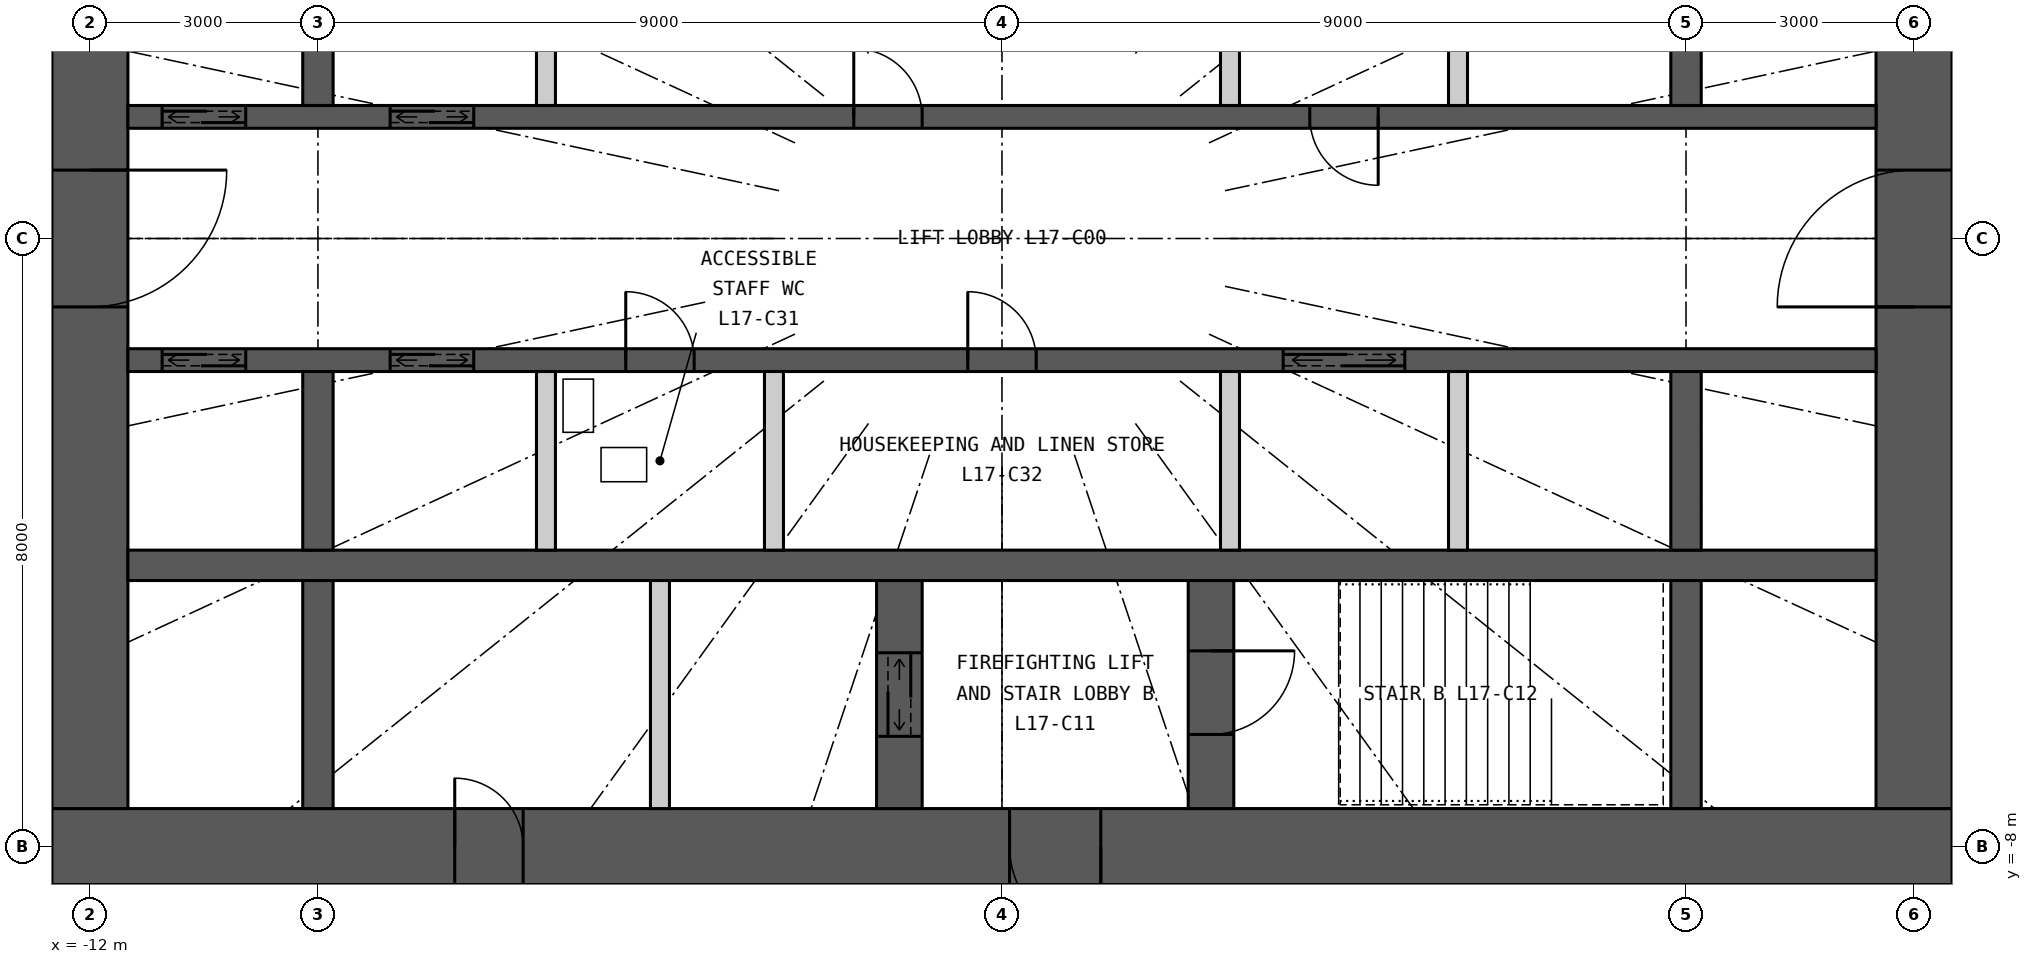
"""IFC4 building model, lengths in metres.
Left out: names, types, materials, properties, quantities, classifications, styles, units other than length and angle.
Written with IfcOpenShell. Run it as: python <this file> out.ifc"""

import sys

from ifc_helpers import new_model, si_unit, direction, frame, frame_2d, origin, place, context, subcontext, project, spatial, rectangle, extrude, element, fill, save


model = new_model("IFC4")
c1 = context("Model", 3, precision=1e-05, world=origin(), true_north=direction((0.0, 1.0)))
c2 = subcontext(c1, "Body", "Model", "MODEL_VIEW")
j1 = project(units=[si_unit("LENGTHUNIT", "METRE"), si_unit("PLANEANGLEUNIT", "RADIAN")], contexts=[c1])
p1 = place(None, origin())
s1 = spatial("IfcSite", under=j1, at=p1, CompositionType="ELEMENT")
p2 = place(p1, origin())
s2 = spatial("IfcBuilding", under=s1, at=p2, CompositionType="ELEMENT")
p3 = place(p2, frame((0.0, 0.0, 70.5)))
s3 = spatial("IfcBuildingStorey", under=s2, at=p3, CompositionType="ELEMENT", Elevation=70.5)
p4 = place(p3, frame((12.5, -8.0, 0.0), z_axis=(0.0, 0.0, 1.0), x_axis=(-1.0, 0.0, 0.0)))
e1 = element("IfcWall", 1, at=p4, inside=s3, PredefinedType="SHEAR", context=c2, shape_type="SweptSolid", body=[
    extrude(rectangle(XDim=25.0, YDim=1.0, at=frame_2d((12.5, 0.0))), origin(), (0.0, 0.0, 1.0), 3.3),
])
p5 = place(p4, frame((11.2, 0.0, 0.0)))
e2 = element("IfcOpeningElement", 2, at=p5, cuts=e1, PredefinedType="OPENING", context=c2, shape_type="SweptSolid", body=[
    extrude(rectangle(XDim=1.2, YDim=2.2, at=frame_2d((0.6, 1.1))), frame((0.0, 0.51, 0.0), z_axis=(0.0, -1.0, 0.0), x_axis=(1.0, 0.0, 0.0)), (0.0, 0.0, 1.0), 1.02),
])
p6 = place(p4, frame((18.8, 0.0, 0.0)))
e3 = element("IfcOpeningElement", 3, at=p6, cuts=e1, PredefinedType="OPENING", context=c2, shape_type="SweptSolid", body=[
    extrude(rectangle(XDim=0.9, YDim=2.2, at=frame_2d((0.45, 1.1))), frame((0.0, 0.51, 0.0), z_axis=(0.0, -1.0, 0.0), x_axis=(1.0, 0.0, 0.0)), (0.0, 0.0, 1.0), 1.02),
])
p7 = place(p3, frame((12.0, -7.5, 0.0), z_axis=(0.0, 0.0, 1.0), x_axis=(0.0, 1.0, 0.0)))
e4 = element("IfcWall", 4, at=p7, inside=s3, PredefinedType="SHEAR", context=c2, shape_type="SweptSolid", body=[
    extrude(rectangle(XDim=15.0, YDim=1.0, at=frame_2d((7.5, 0.0))), origin(), (0.0, 0.0, 1.0), 3.3),
])
p8 = place(p7, frame((6.6, 0.0, 0.0)))
e5 = element("IfcOpeningElement", 5, at=p8, cuts=e4, PredefinedType="OPENING", context=c2, shape_type="SweptSolid", body=[
    extrude(rectangle(XDim=1.8, YDim=2.2, at=frame_2d((0.9, 1.1))), frame((0.0, 0.51, 0.0), z_axis=(0.0, -1.0, 0.0), x_axis=(1.0, 0.0, 0.0)), (0.0, 0.0, 1.0), 1.02),
])
p9 = place(p3, frame((-12.0, 7.5, 0.0), z_axis=(0.0, 0.0, 1.0), x_axis=(0.0, -1.0, 0.0)))
e6 = element("IfcWall", 6, at=p9, inside=s3, PredefinedType="SHEAR", context=c2, shape_type="SweptSolid", body=[
    extrude(rectangle(XDim=15.0, YDim=1.0, at=frame_2d((7.5, 0.0))), origin(), (0.0, 0.0, 1.0), 3.3),
])
p10 = place(p9, frame((6.6, 0.0, 0.0)))
e7 = element("IfcOpeningElement", 7, at=p10, cuts=e6, PredefinedType="OPENING", context=c2, shape_type="SweptSolid", body=[
    extrude(rectangle(XDim=1.8, YDim=2.2, at=frame_2d((0.9, 1.1))), frame((0.0, 0.51, 0.0), z_axis=(0.0, -1.0, 0.0), x_axis=(1.0, 0.0, 0.0)), (0.0, 0.0, 1.0), 1.02),
])
p11 = place(p3, frame((-11.5, 1.6, 0.0), z_axis=(0.0, 0.0, 1.0), x_axis=(1.0, 0.0, 0.0)))
e8 = element("IfcWall", 8, at=p11, inside=s3, PredefinedType="SHEAR", context=c2, shape_type="SweptSolid", body=[
    extrude(rectangle(XDim=23.0, YDim=0.3, at=frame_2d((11.5, 0.0))), origin(), (0.0, 0.0, 1.0), 3.3),
])
p12 = place(p11, frame((0.45, 0.0, 0.0)))
e9 = element("IfcOpeningElement", 9, at=p12, cuts=e8, PredefinedType="OPENING", context=c2, shape_type="SweptSolid", body=[
    extrude(rectangle(XDim=1.1, YDim=2.2, at=frame_2d((0.55, 1.1))), frame((0.0, 0.16, 0.0), z_axis=(0.0, -1.0, 0.0), x_axis=(1.0, 0.0, 0.0)), (0.0, 0.0, 1.0), 0.32),
])
p13 = place(p11, frame((3.45, 0.0, 0.0)))
e10 = element("IfcOpeningElement", 10, at=p13, cuts=e8, PredefinedType="OPENING", context=c2, shape_type="SweptSolid", body=[
    extrude(rectangle(XDim=1.1, YDim=2.2, at=frame_2d((0.55, 1.1))), frame((0.0, 0.16, 0.0), z_axis=(0.0, -1.0, 0.0), x_axis=(1.0, 0.0, 0.0)), (0.0, 0.0, 1.0), 0.32),
])
p14 = place(p11, frame((9.55, 0.0, 0.0)))
e11 = element("IfcOpeningElement", 11, at=p14, cuts=e8, PredefinedType="OPENING", context=c2, shape_type="SweptSolid", body=[
    extrude(rectangle(XDim=0.9, YDim=2.2, at=frame_2d((0.45, 1.1))), frame((0.0, 0.16, 0.0), z_axis=(0.0, -1.0, 0.0), x_axis=(1.0, 0.0, 0.0)), (0.0, 0.0, 1.0), 0.32),
])
p15 = place(p11, frame((15.55, 0.0, 0.0)))
e12 = element("IfcOpeningElement", 12, at=p15, cuts=e8, PredefinedType="OPENING", context=c2, shape_type="SweptSolid", body=[
    extrude(rectangle(XDim=0.9, YDim=2.2, at=frame_2d((0.45, 1.1))), frame((0.0, 0.16, 0.0), z_axis=(0.0, -1.0, 0.0), x_axis=(1.0, 0.0, 0.0)), (0.0, 0.0, 1.0), 0.32),
])
p16 = place(p3, frame((-11.5, -4.3, 0.0), z_axis=(0.0, 0.0, 1.0), x_axis=(1.0, 0.0, 0.0)))
e13 = element("IfcWall", 13, at=p16, inside=s3, PredefinedType="SHEAR", context=c2, shape_type="SweptSolid", body=[
    extrude(rectangle(XDim=23.0, YDim=0.4, at=frame_2d((11.5, 0.0))), origin(), (0.0, 0.0, 1.0), 3.3),
])
p17 = place(p3, frame((-11.5, -1.6, 0.0), z_axis=(0.0, 0.0, 1.0), x_axis=(1.0, 0.0, 0.0)))
e14 = element("IfcWall", 14, at=p17, inside=s3, PredefinedType="SHEAR", context=c2, shape_type="SweptSolid", body=[
    extrude(rectangle(XDim=23.0, YDim=0.3, at=frame_2d((11.5, 0.0))), origin(), (0.0, 0.0, 1.0), 3.3),
])
p18 = place(p17, frame((0.45, 0.0, 0.0)))
e15 = element("IfcOpeningElement", 15, at=p18, cuts=e14, PredefinedType="OPENING", context=c2, shape_type="SweptSolid", body=[
    extrude(rectangle(XDim=1.1, YDim=2.2, at=frame_2d((0.55, 1.1))), frame((0.0, 0.16, 0.0), z_axis=(0.0, -1.0, 0.0), x_axis=(1.0, 0.0, 0.0)), (0.0, 0.0, 1.0), 0.32),
])
p19 = place(p17, frame((3.45, 0.0, 0.0)))
e16 = element("IfcOpeningElement", 16, at=p19, cuts=e14, PredefinedType="OPENING", context=c2, shape_type="SweptSolid", body=[
    extrude(rectangle(XDim=1.1, YDim=2.2, at=frame_2d((0.55, 1.1))), frame((0.0, 0.16, 0.0), z_axis=(0.0, -1.0, 0.0), x_axis=(1.0, 0.0, 0.0)), (0.0, 0.0, 1.0), 0.32),
])
p20 = place(p17, frame((15.2, 0.0, 0.0)))
e17 = element("IfcOpeningElement", 17, at=p20, cuts=e14, PredefinedType="OPENING", context=c2, shape_type="SweptSolid", body=[
    extrude(rectangle(XDim=1.6, YDim=2.4, at=frame_2d((0.8, 1.2))), frame((0.0, 0.16, 0.0), z_axis=(0.0, -1.0, 0.0), x_axis=(1.0, 0.0, 0.0)), (0.0, 0.0, 1.0), 0.32),
])
p21 = place(p17, frame((6.55, 0.0, 0.0)))
e18 = element("IfcOpeningElement", 18, at=p21, cuts=e14, PredefinedType="OPENING", context=c2, shape_type="SweptSolid", body=[
    extrude(rectangle(XDim=0.9, YDim=2.2, at=frame_2d((0.45, 1.1))), frame((0.0, 0.16, 0.0), z_axis=(0.0, -1.0, 0.0), x_axis=(1.0, 0.0, 0.0)), (0.0, 0.0, 1.0), 0.32),
])
p22 = place(p17, frame((11.05, 0.0, 0.0)))
e19 = element("IfcOpeningElement", 19, at=p22, cuts=e14, PredefinedType="OPENING", context=c2, shape_type="SweptSolid", body=[
    extrude(rectangle(XDim=0.9, YDim=2.2, at=frame_2d((0.45, 1.1))), frame((0.0, 0.16, 0.0), z_axis=(0.0, -1.0, 0.0), x_axis=(1.0, 0.0, 0.0)), (0.0, 0.0, 1.0), 0.32),
])
for number, where, z_axis, x_axis in (
    (20, (-9.0, 1.75, 0.0), (0.0, 0.0, 1.0), (0.0, 1.0, 0.0)),
    (21, (-9.0, -4.1, 0.0), (0.0, 0.0, 1.0), (0.0, 1.0, 0.0)),
):
    element("IfcWall", number, at=place(p3, frame(where, z_axis=z_axis, x_axis=x_axis)), inside=s3, PredefinedType="SHEAR", context=c2, shape_type="SweptSolid", body=[
        extrude(rectangle(XDim=2.35, YDim=0.4, at=frame_2d((1.175, 0.0))), origin(), (0.0, 0.0, 1.0), 3.3),
    ])
p23 = place(p3, frame((-9.0, -7.5, 0.0), z_axis=(0.0, 0.0, 1.0), x_axis=(0.0, 1.0, 0.0)))
e22 = element("IfcWall", 22, at=p23, inside=s3, PredefinedType="SHEAR", context=c2, shape_type="SweptSolid", body=[
    extrude(rectangle(XDim=3.0, YDim=0.4, at=frame_2d((1.5, 0.0))), origin(), (0.0, 0.0, 1.0), 3.3),
])
for number, where, z_axis, x_axis in (
    (23, (9.0, 1.75, 0.0), (0.0, 0.0, 1.0), (0.0, 1.0, 0.0)),
    (24, (9.0, -4.1, 0.0), (0.0, 0.0, 1.0), (0.0, 1.0, 0.0)),
):
    element("IfcWall", number, at=place(p3, frame(where, z_axis=z_axis, x_axis=x_axis)), inside=s3, PredefinedType="SHEAR", context=c2, shape_type="SweptSolid", body=[
        extrude(rectangle(XDim=2.35, YDim=0.4, at=frame_2d((1.175, 0.0))), origin(), (0.0, 0.0, 1.0), 3.3),
    ])
p24 = place(p3, frame((9.0, -7.5, 0.0), z_axis=(0.0, 0.0, 1.0), x_axis=(0.0, 1.0, 0.0)))
e25 = element("IfcWall", 25, at=p24, inside=s3, PredefinedType="SHEAR", context=c2, shape_type="SweptSolid", body=[
    extrude(rectangle(XDim=3.0, YDim=0.4, at=frame_2d((1.5, 0.0))), origin(), (0.0, 0.0, 1.0), 3.3),
])
p25 = place(p3, frame((2.75, -7.5, 0.0), z_axis=(0.0, 0.0, 1.0), x_axis=(0.0, 1.0, 0.0)))
e26 = element("IfcWall", 26, at=p25, inside=s3, PredefinedType="SHEAR", context=c2, shape_type="SweptSolid", body=[
    extrude(rectangle(XDim=3.0, YDim=0.6, at=frame_2d((1.5, 0.0))), origin(), (0.0, 0.0, 1.0), 3.3),
])
p26 = place(p25, frame((0.975, 0.0, 0.0)))
e27 = element("IfcOpeningElement", 27, at=p26, cuts=e26, PredefinedType="OPENING", context=c2, shape_type="SweptSolid", body=[
    extrude(rectangle(XDim=1.1, YDim=2.2, at=frame_2d((0.55, 1.1))), frame((0.0, 0.31, 0.0), z_axis=(0.0, -1.0, 0.0), x_axis=(1.0, 0.0, 0.0)), (0.0, 0.0, 1.0), 0.62),
])
p27 = place(p3, frame((-1.35, -7.5, 0.0), z_axis=(0.0, 0.0, 1.0), x_axis=(0.0, 1.0, 0.0)))
e28 = element("IfcWall", 28, at=p27, inside=s3, PredefinedType="SHEAR", context=c2, shape_type="SweptSolid", body=[
    extrude(rectangle(XDim=3.0, YDim=0.6, at=frame_2d((1.5, 0.0))), origin(), (0.0, 0.0, 1.0), 3.3),
])
p28 = place(p27, frame((0.95, 0.0, 0.0)))
e29 = element("IfcOpeningElement", 29, at=p28, cuts=e28, PredefinedType="OPENING", context=c2, shape_type="SweptSolid", body=[
    extrude(rectangle(XDim=1.1, YDim=2.2, at=frame_2d((0.55, 1.1))), frame((0.0, 0.31, 0.0), z_axis=(0.0, -1.0, 0.0), x_axis=(1.0, 0.0, 0.0)), (0.0, 0.0, 1.0), 0.62),
])
p29 = place(p3, frame((-4.5, -7.5, 0.0), z_axis=(0.0, 0.0, 1.0), x_axis=(0.0, 1.0, 0.0)))
e30 = element("IfcWall", 30, at=p29, inside=s3, PredefinedType="PARTITIONING", context=c2, shape_type="SweptSolid", body=[
    extrude(rectangle(XDim=3.0, YDim=0.25, at=frame_2d((1.5, 0.0))), origin(), (0.0, 0.0, 1.0), 3.3),
])
for number, where, z_axis, x_axis in (
    (31, (-6.0, 1.75, 0.0), (0.0, 0.0, 1.0), (0.0, 1.0, 0.0)),
    (32, (3.0, 1.75, 0.0), (0.0, 0.0, 1.0), (0.0, 1.0, 0.0)),
    (33, (6.0, 1.75, 0.0), (0.0, 0.0, 1.0), (0.0, 1.0, 0.0)),
    (34, (-6.0, -4.1, 0.0), (0.0, 0.0, 1.0), (0.0, 1.0, 0.0)),
    (35, (-3.0, -4.1, 0.0), (0.0, 0.0, 1.0), (0.0, 1.0, 0.0)),
    (36, (3.0, -4.1, 0.0), (0.0, 0.0, 1.0), (0.0, 1.0, 0.0)),
    (37, (6.0, -4.1, 0.0), (0.0, 0.0, 1.0), (0.0, 1.0, 0.0)),
):
    element("IfcWall", number, at=place(p3, frame(where, z_axis=z_axis, x_axis=x_axis)), inside=s3, PredefinedType="PARTITIONING", context=c2, shape_type="SweptSolid", body=[
        extrude(rectangle(XDim=2.35, YDim=0.25, at=frame_2d((1.175, 0.0))), origin(), (0.0, 0.0, 1.0), 3.3),
    ])
p30 = place(p5, origin())
e38 = element("IfcDoor", 38, at=p30, inside=s3, OperationType="SINGLE_SWING_LEFT", PredefinedType="DOOR", context=c2, shape_type="SweptSolid", body=[
    extrude(rectangle(XDim=1.2, YDim=2.2, at=frame_2d((0.6, 1.1))), frame((0.0, 0.025, 0.0), z_axis=(0.0, -1.0, 0.0), x_axis=(1.0, 0.0, 0.0)), (0.0, 0.0, 1.0), 0.05),
])
fill(e2, e38)
p31 = place(p26, origin())
e39 = element("IfcDoor", 39, at=p31, inside=s3, OperationType="SINGLE_SWING_RIGHT", PredefinedType="DOOR", context=c2, shape_type="SweptSolid", body=[
    extrude(rectangle(XDim=1.1, YDim=2.2, at=frame_2d((0.55, 1.1))), frame((0.0, 0.025, 0.0), z_axis=(0.0, -1.0, 0.0), x_axis=(1.0, 0.0, 0.0)), (0.0, 0.0, 1.0), 0.05),
])
fill(e27, e39)
p32 = place(p28, origin())
e40 = element("IfcDoor", 40, at=p32, inside=s3, OperationType="DOUBLE_DOOR_SLIDING", PredefinedType="DOOR", context=c2, shape_type="SweptSolid", body=[
    extrude(rectangle(XDim=1.1, YDim=2.2, at=frame_2d((0.55, 1.1))), frame((0.0, 0.025, 0.0), z_axis=(0.0, -1.0, 0.0), x_axis=(1.0, 0.0, 0.0)), (0.0, 0.0, 1.0), 0.05),
])
fill(e29, e40)
p33 = place(p6, origin())
e41 = element("IfcDoor", 41, at=p33, inside=s3, OperationType="SINGLE_SWING_RIGHT", PredefinedType="DOOR", context=c2, shape_type="SweptSolid", body=[
    extrude(rectangle(XDim=0.9, YDim=2.2, at=frame_2d((0.45, 1.1))), frame((0.0, 0.025, 0.0), z_axis=(0.0, -1.0, 0.0), x_axis=(1.0, 0.0, 0.0)), (0.0, 0.0, 1.0), 0.05),
])
fill(e3, e41)
p34 = place(p12, origin())
e42 = element("IfcDoor", 42, at=p34, inside=s3, OperationType="DOUBLE_DOOR_SLIDING", PredefinedType="DOOR", context=c2, shape_type="SweptSolid", body=[
    extrude(rectangle(XDim=1.1, YDim=2.2, at=frame_2d((0.55, 1.1))), frame((0.0, 0.025, 0.0), z_axis=(0.0, -1.0, 0.0), x_axis=(1.0, 0.0, 0.0)), (0.0, 0.0, 1.0), 0.05),
])
fill(e9, e42)
p35 = place(p13, origin())
e43 = element("IfcDoor", 43, at=p35, inside=s3, OperationType="DOUBLE_DOOR_SLIDING", PredefinedType="DOOR", context=c2, shape_type="SweptSolid", body=[
    extrude(rectangle(XDim=1.1, YDim=2.2, at=frame_2d((0.55, 1.1))), frame((0.0, 0.025, 0.0), z_axis=(0.0, -1.0, 0.0), x_axis=(1.0, 0.0, 0.0)), (0.0, 0.0, 1.0), 0.05),
])
fill(e10, e43)
p36 = place(p18, origin())
e44 = element("IfcDoor", 44, at=p36, inside=s3, OperationType="DOUBLE_DOOR_SLIDING", PredefinedType="DOOR", context=c2, shape_type="SweptSolid", body=[
    extrude(rectangle(XDim=1.1, YDim=2.2, at=frame_2d((0.55, 1.1))), frame((0.0, 0.025, 0.0), z_axis=(0.0, -1.0, 0.0), x_axis=(1.0, 0.0, 0.0)), (0.0, 0.0, 1.0), 0.05),
])
fill(e15, e44)
p37 = place(p19, origin())
e45 = element("IfcDoor", 45, at=p37, inside=s3, OperationType="DOUBLE_DOOR_SLIDING", PredefinedType="DOOR", context=c2, shape_type="SweptSolid", body=[
    extrude(rectangle(XDim=1.1, YDim=2.2, at=frame_2d((0.55, 1.1))), frame((0.0, 0.025, 0.0), z_axis=(0.0, -1.0, 0.0), x_axis=(1.0, 0.0, 0.0)), (0.0, 0.0, 1.0), 0.05),
])
fill(e16, e45)
p38 = place(p20, origin())
e46 = element("IfcDoor", 46, at=p38, inside=s3, OperationType="DOUBLE_DOOR_SLIDING", PredefinedType="DOOR", context=c2, shape_type="SweptSolid", body=[
    extrude(rectangle(XDim=1.6, YDim=2.4, at=frame_2d((0.8, 1.2))), frame((0.0, 0.025, 0.0), z_axis=(0.0, -1.0, 0.0), x_axis=(1.0, 0.0, 0.0)), (0.0, 0.0, 1.0), 0.05),
])
fill(e17, e46)
p39 = place(p14, origin())
e47 = element("IfcDoor", 47, at=p39, inside=s3, OperationType="SINGLE_SWING_LEFT", PredefinedType="DOOR", context=c2, shape_type="SweptSolid", body=[
    extrude(rectangle(XDim=0.9, YDim=2.2, at=frame_2d((0.45, 1.1))), frame((0.0, 0.025, 0.0), z_axis=(0.0, -1.0, 0.0), x_axis=(1.0, 0.0, 0.0)), (0.0, 0.0, 1.0), 0.05),
])
fill(e11, e47)
p40 = place(p15, origin())
e48 = element("IfcDoor", 48, at=p40, inside=s3, OperationType="SINGLE_SWING_RIGHT", PredefinedType="DOOR", context=c2, shape_type="SweptSolid", body=[
    extrude(rectangle(XDim=0.9, YDim=2.2, at=frame_2d((0.45, 1.1))), frame((0.0, 0.025, 0.0), z_axis=(0.0, -1.0, 0.0), x_axis=(1.0, 0.0, 0.0)), (0.0, 0.0, 1.0), 0.05),
])
fill(e12, e48)
p41 = place(p21, origin())
e49 = element("IfcDoor", 49, at=p41, inside=s3, OperationType="SINGLE_SWING_LEFT", PredefinedType="DOOR", context=c2, shape_type="SweptSolid", body=[
    extrude(rectangle(XDim=0.9, YDim=2.2, at=frame_2d((0.45, 1.1))), frame((0.0, 0.025, 0.0), z_axis=(0.0, -1.0, 0.0), x_axis=(1.0, 0.0, 0.0)), (0.0, 0.0, 1.0), 0.05),
])
fill(e18, e49)
p42 = place(p22, origin())
e50 = element("IfcDoor", 50, at=p42, inside=s3, OperationType="SINGLE_SWING_LEFT", PredefinedType="DOOR", context=c2, shape_type="SweptSolid", body=[
    extrude(rectangle(XDim=0.9, YDim=2.2, at=frame_2d((0.45, 1.1))), frame((0.0, 0.025, 0.0), z_axis=(0.0, -1.0, 0.0), x_axis=(1.0, 0.0, 0.0)), (0.0, 0.0, 1.0), 0.05),
])
fill(e19, e50)
p43 = place(p8, origin())
e51 = element("IfcDoor", 51, at=p43, inside=s3, OperationType="DOUBLE_DOOR_DOUBLE_SWING", PredefinedType="DOOR", context=c2, shape_type="SweptSolid", body=[
    extrude(rectangle(XDim=1.8, YDim=2.2, at=frame_2d((0.9, 1.1))), frame((0.0, 0.025, 0.0), z_axis=(0.0, -1.0, 0.0), x_axis=(1.0, 0.0, 0.0)), (0.0, 0.0, 1.0), 0.05),
])
fill(e5, e51)
p44 = place(p10, origin())
e52 = element("IfcDoor", 52, at=p44, inside=s3, OperationType="DOUBLE_DOOR_DOUBLE_SWING", PredefinedType="DOOR", context=c2, shape_type="SweptSolid", body=[
    extrude(rectangle(XDim=1.8, YDim=2.2, at=frame_2d((0.9, 1.1))), frame((0.0, 0.025, 0.0), z_axis=(0.0, -1.0, 0.0), x_axis=(1.0, 0.0, 0.0)), (0.0, 0.0, 1.0), 0.05),
])
fill(e7, e52)
save(model, sys.argv[1])
